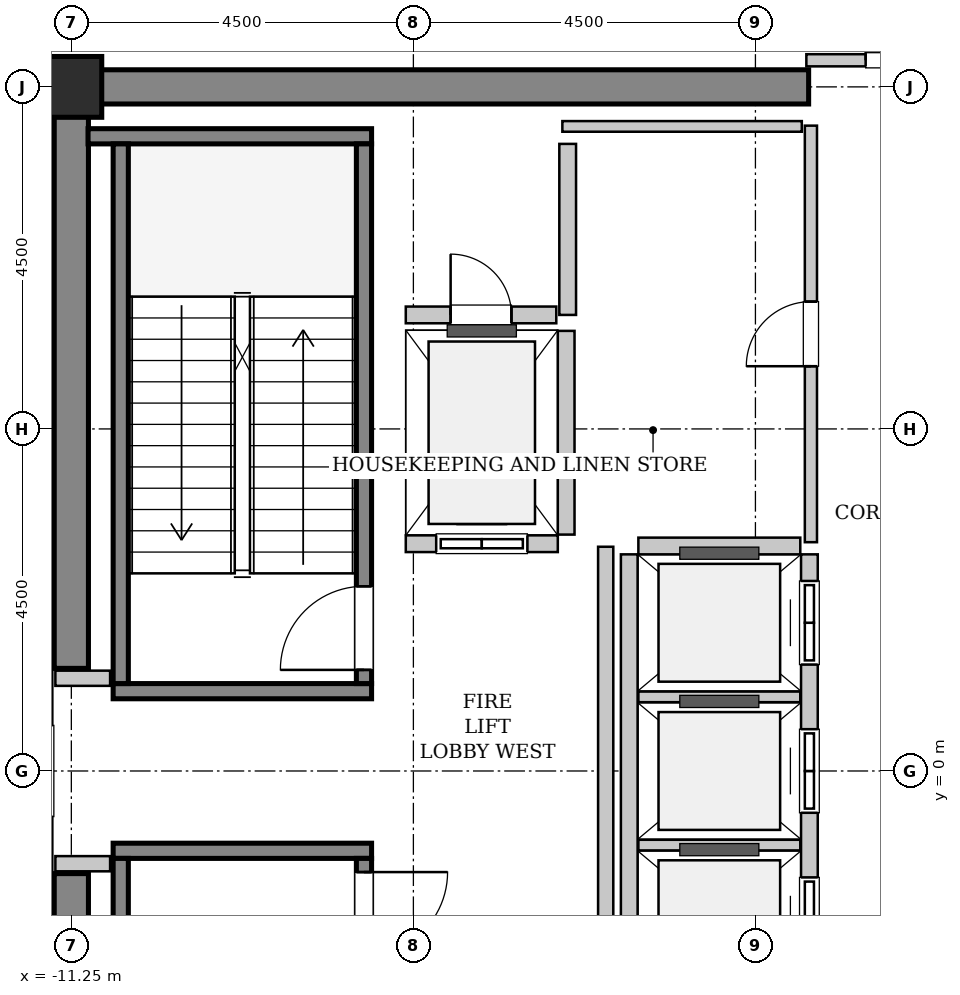
"""IFC4 building model, lengths in metres.
Left out: names, types, materials, properties, quantities, classifications, styles, units other than length and angle.
Written with IfcOpenShell. Run it as: python <this file> out.ifc"""

import sys

from ifc_helpers import new_model, si_unit, direction, frame, frame_2d, origin, origin_2d, place, context, subcontext, project, spatial, rectangle, hollow_rectangle, extrude, source, transform, mapped, element, fill, save


model = new_model("IFC4")
c1 = context("Model", 3, precision=1e-05, world=origin(), true_north=direction((0.0, 1.0)))
c2 = subcontext(c1, "Body", "Model", "MODEL_VIEW")
j1 = project(units=[si_unit("LENGTHUNIT", "METRE"), si_unit("PLANEANGLEUNIT", "RADIAN")], contexts=[c1])
p1 = place(None, origin())
s1 = spatial("IfcSite", under=j1, at=p1, CompositionType="ELEMENT")
p2 = place(p1, origin())
s2 = spatial("IfcBuilding", under=s1, at=p2, CompositionType="ELEMENT")
p3 = place(p2, frame((0.0, 0.0, 259.8)))
s3 = spatial("IfcBuildingStorey", under=s2, at=p3, CompositionType="ELEMENT", Elevation=259.8)
m1 = source(origin(), c2, "Body", "SweptSolid", [
    extrude(rectangle(XDim=9.925, YDim=0.45, at=frame_2d((4.962, 0.0))), origin(), (0.0, 0.0, 1.0), 4.8),
])
p4 = place(p3, frame((-11.475, 9.0, 0.0), z_axis=(0.0, 0.0, 1.0), x_axis=(1.0, 0.0, 0.0)))
e1 = element("IfcWall", 1, at=p4, inside=s3, PredefinedType="SHEAR", context=c2, shape_type="MappedRepresentation", body=[
    mapped(m1, transform((0.0, 0.0, 0.0), x_axis=(1.0, 0.0, 0.0), y_axis=(0.0, 1.0, 0.0), z_axis=(0.0, 0.0, 1.0), scale=1.0)),
])
m2 = source(origin(), c2, "Body", "SweptSolid", [
    extrude(rectangle(XDim=7.425, YDim=0.45, at=frame_2d((3.712, 0.0))), origin(), (0.0, 0.0, 1.0), 4.8),
])
for number, where, z_axis, x_axis in (
    (2, (-11.25, -8.775, 0.0), (0.0, 0.0, 1.0), (0.0, 1.0, 0.0)),
    (3, (-11.25, 1.35, 0.0), (0.0, 0.0, 1.0), (0.0, 1.0, 0.0)),
):
    element("IfcWall", number, at=place(p3, frame(where, z_axis=z_axis, x_axis=x_axis)), inside=s3, PredefinedType="SHEAR", context=c2, shape_type="MappedRepresentation", body=[
        mapped(m2, transform((0.0, 0.0, 0.0), x_axis=(1.0, 0.0, 0.0), y_axis=(0.0, 1.0, 0.0), z_axis=(0.0, 0.0, 1.0), scale=1.0)),
    ])
m3 = source(origin(), c2, "Body", "SweptSolid", [
    extrude(hollow_rectangle(XDim=0.8, YDim=0.8, WallThickness=0.04, InnerFilletRadius=0.04, OuterFilletRadius=0.08, at=origin_2d()), origin(), (0.0, 0.0, 1.0), 4.8),
])
p5 = place(p3, frame((-11.25, 9.0, 0.0), z_axis=(0.0, 0.0, 1.0), x_axis=(1.0, 0.0, 0.0)))
e4 = element("IfcColumn", 4, at=p5, inside=s3, PredefinedType="COLUMN", context=c2, shape_type="MappedRepresentation", body=[
    mapped(m3, transform((0.0, 0.0, 0.0), x_axis=(1.0, 0.0, 0.0), y_axis=(0.0, 1.0, 0.0), z_axis=(0.0, 0.0, 1.0), scale=1.0)),
])
m4 = source(origin(), c2, "Body", "SweptSolid", [
    extrude(rectangle(XDim=3.4, YDim=0.2, at=frame_2d((1.7, 0.0))), origin(), (0.0, 0.0, 1.0), 4.8),
])
p6 = place(p3, frame((-7.3, 1.05, 0.0), z_axis=(0.0, 0.0, 1.0), x_axis=(-1.0, 0.0, 0.0)))
e5 = element("IfcWall", 5, at=p6, inside=s3, PredefinedType="SOLIDWALL", context=c2, shape_type="MappedRepresentation", body=[
    mapped(m4, transform((0.0, 0.0, 0.0), x_axis=(1.0, 0.0, 0.0), y_axis=(0.0, 1.0, 0.0), z_axis=(0.0, 0.0, 1.0), scale=1.0)),
])
m5 = source(origin(), c2, "Body", "SweptSolid", [
    extrude(rectangle(XDim=3.73, YDim=0.2, at=frame_2d((1.865, 0.0))), origin(), (0.0, 0.0, 1.0), 4.8),
])
p7 = place(p3, frame((-7.3, 8.35, 0.0), z_axis=(0.0, 0.0, 1.0), x_axis=(-1.0, 0.0, 0.0)))
e6 = element("IfcWall", 6, at=p7, inside=s3, PredefinedType="SOLIDWALL", context=c2, shape_type="MappedRepresentation", body=[
    mapped(m5, transform((0.0, 0.0, 0.0), x_axis=(1.0, 0.0, 0.0), y_axis=(0.0, 1.0, 0.0), z_axis=(0.0, 0.0, 1.0), scale=1.0)),
])
m6 = source(origin(), c2, "Body", "SweptSolid", [
    extrude(rectangle(XDim=7.1, YDim=0.2, at=frame_2d((3.55, 0.0))), origin(), (0.0, 0.0, 1.0), 4.8),
])
p8 = place(p3, frame((-7.4, 1.15, 0.0), z_axis=(0.0, 0.0, 1.0), x_axis=(0.0, 1.0, 0.0)))
e7 = element("IfcWall", 7, at=p8, inside=s3, PredefinedType="SOLIDWALL", context=c2, shape_type="MappedRepresentation", body=[
    mapped(m6, transform((0.0, 0.0, 0.0), x_axis=(1.0, 0.0, 0.0), y_axis=(0.0, 1.0, 0.0), z_axis=(0.0, 0.0, 1.0), scale=1.0)),
])
p9 = place(p8, frame((0.18, 0.0, 0.0)))
e8 = element("IfcOpeningElement", 8, at=p9, cuts=e7, PredefinedType="OPENING", context=c2, shape_type="SweptSolid", body=[
    extrude(rectangle(XDim=1.1, YDim=2.15, at=frame_2d((0.55, 1.075))), frame((0.0, 0.11, 0.0), z_axis=(0.0, -1.0, 0.0), x_axis=(1.0, 0.0, 0.0)), (0.0, 0.0, 1.0), 0.22),
])
p10 = place(p3, frame((-10.6, 1.15, 0.0), z_axis=(0.0, 0.0, 1.0), x_axis=(0.0, 1.0, 0.0)))
e9 = element("IfcWall", 9, at=p10, inside=s3, PredefinedType="SOLIDWALL", context=c2, shape_type="MappedRepresentation", body=[
    mapped(m6, transform((0.0, 0.0, 0.0), x_axis=(1.0, 0.0, 0.0), y_axis=(0.0, 1.0, 0.0), z_axis=(0.0, 0.0, 1.0), scale=1.0)),
])
p11 = place(p3, frame((-10.7, -1.05, 0.0), z_axis=(0.0, 0.0, 1.0), x_axis=(1.0, 0.0, 0.0)))
e10 = element("IfcWall", 10, at=p11, inside=s3, PredefinedType="SOLIDWALL", context=c2, shape_type="MappedRepresentation", body=[
    mapped(m4, transform((0.0, 0.0, 0.0), x_axis=(1.0, 0.0, 0.0), y_axis=(0.0, 1.0, 0.0), z_axis=(0.0, 0.0, 1.0), scale=1.0)),
])
p12 = place(p3, frame((-10.6, -1.15, 0.0), z_axis=(0.0, 0.0, 1.0), x_axis=(0.0, -1.0, 0.0)))
e11 = element("IfcWall", 11, at=p12, inside=s3, PredefinedType="SOLIDWALL", context=c2, shape_type="MappedRepresentation", body=[
    mapped(m6, transform((0.0, 0.0, 0.0), x_axis=(1.0, 0.0, 0.0), y_axis=(0.0, 1.0, 0.0), z_axis=(0.0, 0.0, 1.0), scale=1.0)),
])
p13 = place(p3, frame((-7.4, -1.15, 0.0), z_axis=(0.0, 0.0, 1.0), x_axis=(0.0, -1.0, 0.0)))
e12 = element("IfcWall", 12, at=p13, inside=s3, PredefinedType="SOLIDWALL", context=c2, shape_type="MappedRepresentation", body=[
    mapped(m6, transform((0.0, 0.0, 0.0), x_axis=(1.0, 0.0, 0.0), y_axis=(0.0, 1.0, 0.0), z_axis=(0.0, 0.0, 1.0), scale=1.0)),
])
p14 = place(p13, frame((0.18, 0.0, 0.0)))
e13 = element("IfcOpeningElement", 13, at=p14, cuts=e12, PredefinedType="OPENING", context=c2, shape_type="SweptSolid", body=[
    extrude(rectangle(XDim=1.1, YDim=2.15, at=frame_2d((0.55, 1.075))), frame((0.0, 0.11, 0.0), z_axis=(0.0, -1.0, 0.0), x_axis=(1.0, 0.0, 0.0)), (0.0, 0.0, 1.0), 0.22),
])
m7 = source(origin(), c2, "Body", "SweptSolid", [
    extrude(rectangle(XDim=2.0, YDim=0.22, at=frame_2d((1.0, 0.0))), origin(), (0.0, 0.0, 1.0), 4.535),
])
p15 = place(p3, frame((-6.85, 2.99, 0.0), z_axis=(0.0, 0.0, 1.0), x_axis=(1.0, 0.0, 0.0)))
e14 = element("IfcWall", 14, at=p15, inside=s3, PredefinedType="SOLIDWALL", context=c2, shape_type="MappedRepresentation", body=[
    mapped(m7, transform((0.0, 0.0, 0.0), x_axis=(1.0, 0.0, 0.0), y_axis=(0.0, 1.0, 0.0), z_axis=(0.0, 0.0, 1.0), scale=1.0)),
])
p16 = place(p15, frame((0.4, 0.0, 0.0)))
e15 = element("IfcOpeningElement", 15, at=p16, cuts=e14, PredefinedType="OPENING", context=c2, shape_type="SweptSolid", body=[
    extrude(rectangle(XDim=1.2, YDim=2.2, at=frame_2d((0.6, 1.1))), frame((0.0, 0.12, 0.0), z_axis=(0.0, -1.0, 0.0), x_axis=(1.0, 0.0, 0.0)), (0.0, 0.0, 1.0), 0.24),
])
m8 = source(origin(), c2, "Body", "SweptSolid", [
    extrude(rectangle(XDim=2.68, YDim=0.22, at=frame_2d((1.34, 0.0))), origin(), (0.0, 0.0, 1.0), 4.535),
])
p17 = place(p3, frame((-4.74, 3.11, 0.0), z_axis=(0.0, 0.0, 1.0), x_axis=(0.0, 1.0, 0.0)))
e16 = element("IfcWall", 16, at=p17, inside=s3, PredefinedType="SOLIDWALL", context=c2, shape_type="MappedRepresentation", body=[
    mapped(m8, transform((0.0, 0.0, 0.0), x_axis=(1.0, 0.0, 0.0), y_axis=(0.0, 1.0, 0.0), z_axis=(0.0, 0.0, 1.0), scale=1.0)),
])
m9 = source(origin(), c2, "Body", "SweptSolid", [
    extrude(rectangle(XDim=5.7, YDim=0.22, at=frame_2d((2.85, 0.0))), origin(), (0.0, 0.0, 1.0), 4.535),
])
p18 = place(p3, frame((-1.54, -2.85, 0.0), z_axis=(0.0, 0.0, 1.0), x_axis=(0.0, 1.0, 0.0)))
e17 = element("IfcWall", 17, at=p18, inside=s3, PredefinedType="SOLIDWALL", context=c2, shape_type="MappedRepresentation", body=[
    mapped(m9, transform((0.0, 0.0, 0.0), x_axis=(1.0, 0.0, 0.0), y_axis=(0.0, 1.0, 0.0), z_axis=(0.0, 0.0, 1.0), scale=1.0)),
])
p19 = place(p18, frame((0.35, 0.0, 0.0)))
e18 = element("IfcOpeningElement", 18, at=p19, cuts=e17, PredefinedType="OPENING", context=c2, shape_type="SweptSolid", body=[
    extrude(rectangle(XDim=1.1, YDim=2.2, at=frame_2d((0.55, 1.1))), frame((0.0, 0.12, 0.0), z_axis=(0.0, -1.0, 0.0), x_axis=(1.0, 0.0, 0.0)), (0.0, 0.0, 1.0), 0.24),
])
p20 = place(p18, frame((2.3, 0.0, 0.0)))
e19 = element("IfcOpeningElement", 19, at=p20, cuts=e17, PredefinedType="OPENING", context=c2, shape_type="SweptSolid", body=[
    extrude(rectangle(XDim=1.1, YDim=2.2, at=frame_2d((0.55, 1.1))), frame((0.0, 0.12, 0.0), z_axis=(0.0, -1.0, 0.0), x_axis=(1.0, 0.0, 0.0)), (0.0, 0.0, 1.0), 0.24),
])
p21 = place(p18, frame((4.25, 0.0, 0.0)))
e20 = element("IfcOpeningElement", 20, at=p21, cuts=e17, PredefinedType="OPENING", context=c2, shape_type="SweptSolid", body=[
    extrude(rectangle(XDim=1.1, YDim=2.2, at=frame_2d((0.55, 1.1))), frame((0.0, 0.12, 0.0), z_axis=(0.0, -1.0, 0.0), x_axis=(1.0, 0.0, 0.0)), (0.0, 0.0, 1.0), 0.24),
])
p22 = place(p3, frame((-3.91, 2.85, 0.0), z_axis=(0.0, 0.0, 1.0), x_axis=(0.0, -1.0, 0.0)))
e21 = element("IfcWall", 21, at=p22, inside=s3, PredefinedType="SOLIDWALL", context=c2, shape_type="MappedRepresentation", body=[
    mapped(m9, transform((0.0, 0.0, 0.0), x_axis=(1.0, 0.0, 0.0), y_axis=(0.0, 1.0, 0.0), z_axis=(0.0, 0.0, 1.0), scale=1.0)),
])
m10 = source(origin(), c2, "Body", "SweptSolid", [
    extrude(rectangle(XDim=2.13, YDim=0.14, at=frame_2d((1.065, 0.0))), origin(), (0.0, 0.0, 1.0), 4.535),
])
for number, where, z_axis, x_axis in (
    (22, (-3.79, -0.975, 0.0), (0.0, 0.0, 1.0), (1.0, 0.0, 0.0)),
    (23, (-3.79, 0.975, 0.0), (0.0, 0.0, 1.0), (1.0, 0.0, 0.0)),
):
    element("IfcWall", number, at=place(p3, frame(where, z_axis=z_axis, x_axis=x_axis)), inside=s3, PredefinedType="PARTITIONING", context=c2, shape_type="MappedRepresentation", body=[
        mapped(m10, transform((0.0, 0.0, 0.0), x_axis=(1.0, 0.0, 0.0), y_axis=(0.0, 1.0, 0.0), z_axis=(0.0, 0.0, 1.0), scale=1.0)),
    ])
m11 = source(origin(), c2, "Body", "SweptSolid", [
    extrude(rectangle(XDim=2.13, YDim=0.22, at=frame_2d((1.065, 0.0))), origin(), (0.0, 0.0, 1.0), 4.535),
])
p23 = place(p3, frame((-1.66, 2.96, 0.0), z_axis=(0.0, 0.0, 1.0), x_axis=(-1.0, 0.0, 0.0)))
e24 = element("IfcWall", 24, at=p23, inside=s3, PredefinedType="SOLIDWALL", context=c2, shape_type="MappedRepresentation", body=[
    mapped(m11, transform((0.0, 0.0, 0.0), x_axis=(1.0, 0.0, 0.0), y_axis=(0.0, 1.0, 0.0), z_axis=(0.0, 0.0, 1.0), scale=1.0)),
])
m12 = source(origin(), c2, "Body", "SweptSolid", [
    extrude(rectangle(XDim=2.25, YDim=0.22, at=frame_2d((1.125, 0.0))), origin(), (0.0, 0.0, 1.0), 4.535),
])
p24 = place(p3, frame((-4.72, 6.0, 0.0), z_axis=(0.0, 0.0, 1.0), x_axis=(0.0, 1.0, 0.0)))
e25 = element("IfcWall", 25, at=p24, inside=s3, PredefinedType="SOLIDWALL", context=c2, shape_type="MappedRepresentation", body=[
    mapped(m12, transform((0.0, 0.0, 0.0), x_axis=(1.0, 0.0, 0.0), y_axis=(0.0, 1.0, 0.0), z_axis=(0.0, 0.0, 1.0), scale=1.0)),
])
m13 = source(origin(), c2, "Body", "SweptSolid", [
    extrude(rectangle(XDim=1.98, YDim=0.22, at=frame_2d((0.99, 0.0))), origin(), (0.0, 0.0, 1.0), 4.535),
])
p25 = place(p3, frame((-6.85, 6.0, 0.0), z_axis=(0.0, 0.0, 1.0), x_axis=(1.0, 0.0, 0.0)))
e26 = element("IfcWall", 26, at=p25, inside=s3, PredefinedType="SOLIDWALL", context=c2, shape_type="MappedRepresentation", body=[
    mapped(m13, transform((0.0, 0.0, 0.0), x_axis=(1.0, 0.0, 0.0), y_axis=(0.0, 1.0, 0.0), z_axis=(0.0, 0.0, 1.0), scale=1.0)),
])
p26 = place(p25, frame((0.59, 0.0, 0.0)))
e27 = element("IfcOpeningElement", 27, at=p26, cuts=e26, PredefinedType="OPENING", context=c2, shape_type="SweptSolid", body=[
    extrude(rectangle(XDim=0.8, YDim=2.0, at=frame_2d((0.4, 1.0))), frame((0.0, 0.12, 0.0), z_axis=(0.0, -1.0, 0.0), x_axis=(1.0, 0.0, 0.0)), (0.0, 0.0, 1.0), 0.24),
])
m14 = source(origin(), c2, "Body", "SweptSolid", [
    extrude(rectangle(XDim=5.9, YDim=0.2, at=frame_2d((2.95, 0.0))), origin(), (0.0, 0.0, 1.0), 4.535),
])
p27 = place(p3, frame((-4.22, -2.95, 0.0), z_axis=(0.0, 0.0, 1.0), x_axis=(0.0, 1.0, 0.0)))
e28 = element("IfcWall", 28, at=p27, inside=s3, PredefinedType="PARTITIONING", context=c2, shape_type="MappedRepresentation", body=[
    mapped(m14, transform((0.0, 0.0, 0.0), x_axis=(1.0, 0.0, 0.0), y_axis=(0.0, 1.0, 0.0), z_axis=(0.0, 0.0, 1.0), scale=1.0)),
])
m15 = source(origin(), c2, "Body", "SweptSolid", [
    extrude(rectangle(XDim=0.72, YDim=0.2, at=frame_2d((0.36, 0.0))), origin(), (0.0, 0.0, 1.0), 4.535),
])
for number, where, z_axis, x_axis in (
    (29, (-11.46, 1.22, 0.0), (0.0, 0.0, 1.0), (1.0, 0.0, 0.0)),
    (30, (-11.46, -1.22, 0.0), (0.0, 0.0, 1.0), (1.0, 0.0, 0.0)),
):
    element("IfcWall", number, at=place(p3, frame(where, z_axis=z_axis, x_axis=x_axis)), inside=s3, PredefinedType="PARTITIONING", context=c2, shape_type="MappedRepresentation", body=[
        mapped(m15, transform((0.0, 0.0, 0.0), x_axis=(1.0, 0.0, 0.0), y_axis=(0.0, 1.0, 0.0), z_axis=(0.0, 0.0, 1.0), scale=1.0)),
    ])
m16 = source(origin(), c2, "Body", "SweptSolid", [
    extrude(rectangle(XDim=3.16, YDim=0.16, at=frame_2d((1.58, 0.0))), origin(), (0.0, 0.0, 1.0), 3.625),
])
p28 = place(p3, frame((-1.58, 9.35, 0.0), z_axis=(0.0, 0.0, 1.0), x_axis=(1.0, 0.0, 0.0)))
e31 = element("IfcWall", 31, at=p28, inside=s3, PredefinedType="PARTITIONING", context=c2, shape_type="MappedRepresentation", body=[
    mapped(m16, transform((0.0, 0.0, 0.0), x_axis=(1.0, 0.0, 0.0), y_axis=(0.0, 1.0, 0.0), z_axis=(0.0, 0.0, 1.0), scale=1.0)),
])
p29 = place(p28, frame((0.78, 0.0, 0.0)))
e32 = element("IfcOpeningElement", 32, at=p29, cuts=e31, PredefinedType="OPENING", context=c2, shape_type="SweptSolid", body=[
    extrude(rectangle(XDim=1.6, YDim=2.3, at=frame_2d((0.8, 1.15))), frame((0.0, 0.09, 0.0), z_axis=(0.0, -1.0, 0.0), x_axis=(1.0, 0.0, 0.0)), (0.0, 0.0, 1.0), 0.18),
])
m17 = source(origin(), c2, "Body", "SweptSolid", [
    extrude(rectangle(XDim=5.48, YDim=0.16, at=frame_2d((2.74, 0.0))), origin(), (0.0, 0.0, 1.0), 4.535),
])
p30 = place(p3, frame((-1.52, 3.01, 0.0), z_axis=(0.0, 0.0, 1.0), x_axis=(0.0, 1.0, 0.0)))
e33 = element("IfcWall", 33, at=p30, inside=s3, PredefinedType="PARTITIONING", context=c2, shape_type="MappedRepresentation", body=[
    mapped(m17, transform((0.0, 0.0, 0.0), x_axis=(1.0, 0.0, 0.0), y_axis=(0.0, 1.0, 0.0), z_axis=(0.0, 0.0, 1.0), scale=1.0)),
])
p31 = place(p30, frame((2.315, 0.0, 0.0)))
e34 = element("IfcOpeningElement", 34, at=p31, cuts=e33, PredefinedType="OPENING", context=c2, shape_type="SweptSolid", body=[
    extrude(rectangle(XDim=0.85, YDim=2.1, at=frame_2d((0.425, 1.05))), frame((0.0, 0.09, 0.0), z_axis=(0.0, -1.0, 0.0), x_axis=(1.0, 0.0, 0.0)), (0.0, 0.0, 1.0), 0.18),
])
m18 = source(origin(), c2, "Body", "SweptSolid", [
    extrude(rectangle(XDim=3.15, YDim=0.14, at=frame_2d((1.575, 0.0))), origin(), (0.0, 0.0, 1.0), 4.535),
])
p32 = place(p3, frame((-4.79, 8.48, 0.0), z_axis=(0.0, 0.0, 1.0), x_axis=(1.0, 0.0, 0.0)))
e35 = element("IfcWall", 35, at=p32, inside=s3, PredefinedType="PARTITIONING", context=c2, shape_type="MappedRepresentation", body=[
    mapped(m18, transform((0.0, 0.0, 0.0), x_axis=(1.0, 0.0, 0.0), y_axis=(0.0, 1.0, 0.0), z_axis=(0.0, 0.0, 1.0), scale=1.0)),
])
m19 = source(origin(), c2, "Body", "SweptSolid", [
    extrude(rectangle(XDim=1.1, YDim=2.15, at=frame_2d((0.55, 1.075))), frame((0.0, 0.025, 0.0), z_axis=(0.0, -1.0, 0.0), x_axis=(1.0, 0.0, 0.0)), (0.0, 0.0, 1.0), 0.05),
])
p33 = place(p9, origin())
e36 = element("IfcDoor", 36, at=p33, inside=s3, OperationType="SINGLE_SWING_LEFT", PredefinedType="DOOR", context=c2, shape_type="MappedRepresentation", body=[
    mapped(m19, transform((0.0, 0.0, 0.0), x_axis=(1.0, 0.0, 0.0), y_axis=(0.0, 1.0, 0.0), z_axis=(0.0, 0.0, 1.0), scale=1.0)),
])
fill(e8, e36)
p34 = place(p14, origin())
e37 = element("IfcDoor", 37, at=p34, inside=s3, OperationType="SINGLE_SWING_LEFT", PredefinedType="DOOR", context=c2, shape_type="MappedRepresentation", body=[
    mapped(m19, transform((0.0, 0.0, 0.0), x_axis=(1.0, 0.0, 0.0), y_axis=(0.0, 1.0, 0.0), z_axis=(0.0, 0.0, 1.0), scale=1.0)),
])
fill(e13, e37)
m20 = source(origin(), c2, "Body", "SweptSolid", [
    extrude(rectangle(XDim=1.2, YDim=2.2, at=frame_2d((0.6, 1.1))), frame((0.0, 0.025, 0.0), z_axis=(0.0, -1.0, 0.0), x_axis=(1.0, 0.0, 0.0)), (0.0, 0.0, 1.0), 0.05),
])
p35 = place(p16, origin())
e38 = element("IfcDoor", 38, at=p35, inside=s3, OperationType="SLIDING_TO_LEFT", PredefinedType="DOOR", context=c2, shape_type="MappedRepresentation", body=[
    mapped(m20, transform((0.0, 0.0, 0.0), x_axis=(1.0, 0.0, 0.0), y_axis=(0.0, 1.0, 0.0), z_axis=(0.0, 0.0, 1.0), scale=1.0)),
])
fill(e15, e38)
m21 = source(origin(), c2, "Body", "SweptSolid", [
    extrude(rectangle(XDim=1.1, YDim=2.2, at=frame_2d((0.55, 1.1))), frame((0.0, 0.025, 0.0), z_axis=(0.0, -1.0, 0.0), x_axis=(1.0, 0.0, 0.0)), (0.0, 0.0, 1.0), 0.05),
])
p36 = place(p19, origin())
e39 = element("IfcDoor", 39, at=p36, inside=s3, OperationType="DOUBLE_DOOR_SLIDING", PredefinedType="DOOR", context=c2, shape_type="MappedRepresentation", body=[
    mapped(m21, transform((0.0, 0.0, 0.0), x_axis=(1.0, 0.0, 0.0), y_axis=(0.0, 1.0, 0.0), z_axis=(0.0, 0.0, 1.0), scale=1.0)),
])
fill(e18, e39)
p37 = place(p20, origin())
e40 = element("IfcDoor", 40, at=p37, inside=s3, OperationType="DOUBLE_DOOR_SLIDING", PredefinedType="DOOR", context=c2, shape_type="MappedRepresentation", body=[
    mapped(m21, transform((0.0, 0.0, 0.0), x_axis=(1.0, 0.0, 0.0), y_axis=(0.0, 1.0, 0.0), z_axis=(0.0, 0.0, 1.0), scale=1.0)),
])
fill(e19, e40)
p38 = place(p21, origin())
e41 = element("IfcDoor", 41, at=p38, inside=s3, OperationType="DOUBLE_DOOR_SLIDING", PredefinedType="DOOR", context=c2, shape_type="MappedRepresentation", body=[
    mapped(m21, transform((0.0, 0.0, 0.0), x_axis=(1.0, 0.0, 0.0), y_axis=(0.0, 1.0, 0.0), z_axis=(0.0, 0.0, 1.0), scale=1.0)),
])
fill(e20, e41)
m22 = source(origin(), c2, "Body", "SweptSolid", [
    extrude(rectangle(XDim=0.8, YDim=2.0, at=frame_2d((0.4, 1.0))), frame((0.0, 0.025, 0.0), z_axis=(0.0, -1.0, 0.0), x_axis=(1.0, 0.0, 0.0)), (0.0, 0.0, 1.0), 0.05),
])
p39 = place(p26, origin())
e42 = element("IfcDoor", 42, at=p39, inside=s3, OperationType="SINGLE_SWING_LEFT", PredefinedType="TRAPDOOR", context=c2, shape_type="MappedRepresentation", body=[
    mapped(m22, transform((0.0, 0.0, 0.0), x_axis=(1.0, 0.0, 0.0), y_axis=(0.0, 1.0, 0.0), z_axis=(0.0, 0.0, 1.0), scale=1.0)),
])
fill(e27, e42)
m23 = source(origin(), c2, "Body", "SweptSolid", [
    extrude(rectangle(XDim=1.6, YDim=2.3, at=frame_2d((0.8, 1.15))), frame((0.0, 0.025, 0.0), z_axis=(0.0, -1.0, 0.0), x_axis=(1.0, 0.0, 0.0)), (0.0, 0.0, 1.0), 0.05),
])
p40 = place(p29, origin())
e43 = element("IfcDoor", 43, at=p40, inside=s3, OperationType="DOUBLE_DOOR_SINGLE_SWING", PredefinedType="DOOR", context=c2, shape_type="MappedRepresentation", body=[
    mapped(m23, transform((0.0, 0.0, 0.0), x_axis=(1.0, 0.0, 0.0), y_axis=(0.0, 1.0, 0.0), z_axis=(0.0, 0.0, 1.0), scale=1.0)),
])
fill(e32, e43)
m24 = source(origin(), c2, "Body", "SweptSolid", [
    extrude(rectangle(XDim=0.85, YDim=2.1, at=frame_2d((0.425, 1.05))), frame((0.0, 0.025, 0.0), z_axis=(0.0, -1.0, 0.0), x_axis=(1.0, 0.0, 0.0)), (0.0, 0.0, 1.0), 0.05),
])
p41 = place(p31, origin())
e44 = element("IfcDoor", 44, at=p41, inside=s3, OperationType="SINGLE_SWING_LEFT", PredefinedType="DOOR", context=c2, shape_type="MappedRepresentation", body=[
    mapped(m24, transform((0.0, 0.0, 0.0), x_axis=(1.0, 0.0, 0.0), y_axis=(0.0, 1.0, 0.0), z_axis=(0.0, 0.0, 1.0), scale=1.0)),
])
fill(e34, e44)
save(model, sys.argv[1])
